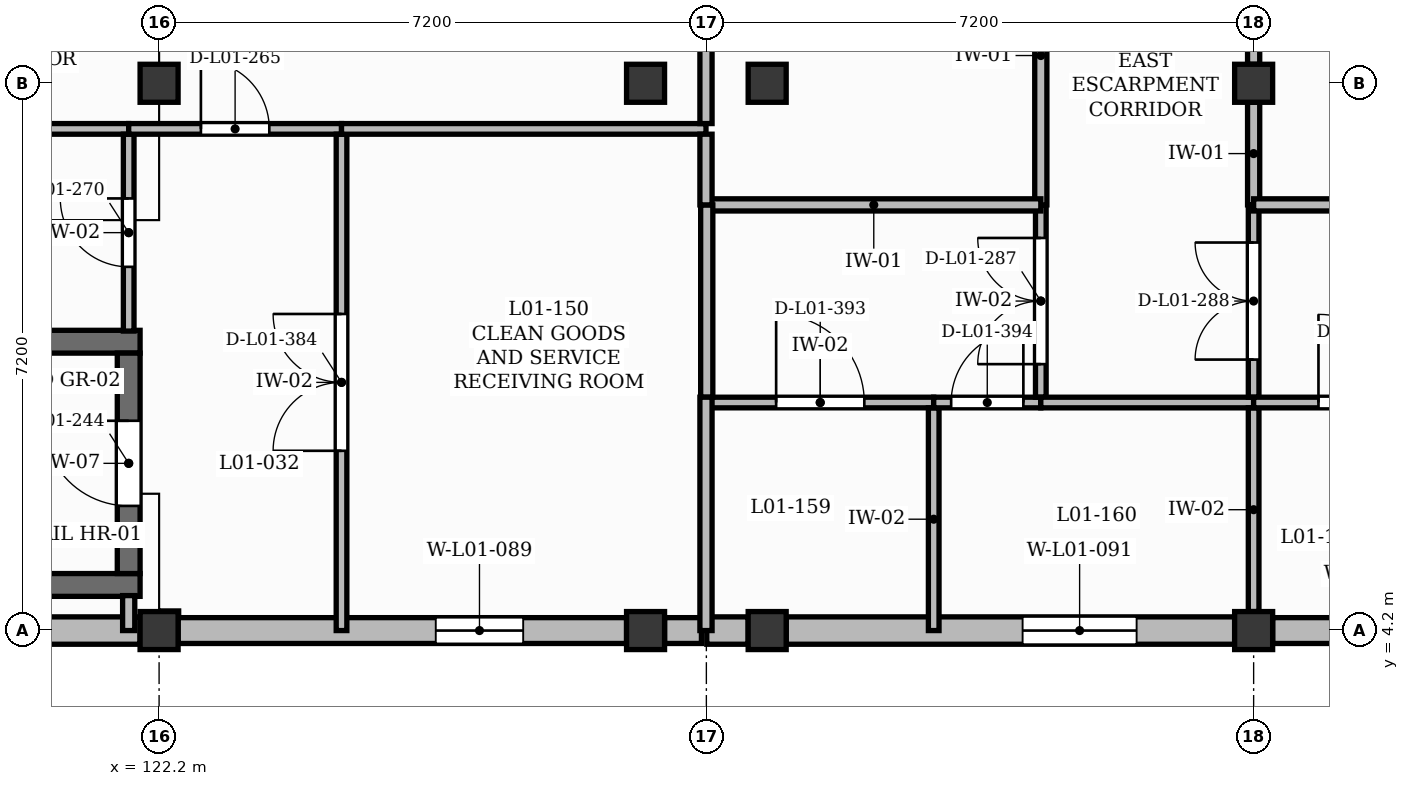
"""IFC4 building model, lengths in metres.
Left out: names, types, materials, properties, quantities, classifications, styles, units other than length and angle.
Written with IfcOpenShell. Run it as: python <this file> out.ifc"""

import sys

from ifc_helpers import new_model, si_unit, direction, frame, frame_2d, origin, origin_2d, place, context, subcontext, project, spatial, rectangle, extrude, element, fill, save


model = new_model("IFC4")
c1 = context("Model", 3, precision=1e-05, world=origin(), true_north=direction((0.0, 1.0)))
c2 = subcontext(c1, "Body", "Model", "MODEL_VIEW")
j1 = project(units=[si_unit("LENGTHUNIT", "METRE"), si_unit("PLANEANGLEUNIT", "RADIAN")], contexts=[c1])
p1 = place(None, origin())
s1 = spatial("IfcSite", under=j1, at=p1, CompositionType="ELEMENT")
p2 = place(p1, origin())
s2 = spatial("IfcBuilding", under=s1, at=p2, CompositionType="ELEMENT")
p3 = place(p2, frame((0.0, 0.0, 4.5)))
s3 = spatial("IfcBuildingStorey", under=s2, at=p3, CompositionType="ELEMENT", Elevation=4.5)
for number, where, z_axis, x_axis in (
    (1, (122.2, 4.2, 0.0), (0.0, 0.0, 1.0), (1.0, 0.0, 0.0)),
    (2, (122.2, 11.4, 0.0), (0.0, 0.0, 1.0), (1.0, 0.0, 0.0)),
    (3, (128.6, 4.2, 0.0), (0.0, 0.0, 1.0), (1.0, 0.0, 0.0)),
    (4, (128.6, 11.4, 0.0), (0.0, 0.0, 1.0), (1.0, 0.0, 0.0)),
    (5, (130.2, 4.2, 0.0), (0.0, 0.0, 1.0), (1.0, 0.0, 0.0)),
    (6, (130.2, 11.4, 0.0), (0.0, 0.0, 1.0), (1.0, 0.0, 0.0)),
    (7, (136.6, 4.2, 0.0), (0.0, 0.0, 1.0), (1.0, 0.0, 0.0)),
    (8, (136.6, 11.4, 0.0), (0.0, 0.0, 1.0), (1.0, 0.0, 0.0)),
):
    element("IfcColumn", number, at=place(p3, frame(where, z_axis=z_axis, x_axis=x_axis)), inside=s3, PredefinedType="COLUMN", context=c2, shape_type="SweptSolid", body=[
        extrude(rectangle(XDim=0.5, YDim=0.5, at=origin_2d()), origin(), (0.0, 0.0, 1.0), 4.22),
    ])
p4 = place(p3, frame((115.25, 4.2, 0.0), z_axis=(0.0, 0.0, 1.0), x_axis=(1.0, 0.0, 0.0)))
e9 = element("IfcWall", 9, at=p4, inside=s3, PredefinedType="SOLIDWALL", context=c2, shape_type="SweptSolid", body=[
    extrude(rectangle(XDim=6.7, YDim=0.36, at=frame_2d((3.35, 0.0))), origin(), (0.0, 0.0, 1.0), 3.52),
])
p5 = place(p3, frame((122.45, 4.2, 0.0), z_axis=(0.0, 0.0, 1.0), x_axis=(1.0, 0.0, 0.0)))
e10 = element("IfcWall", 10, at=p5, inside=s3, PredefinedType="SOLIDWALL", context=c2, shape_type="SweptSolid", body=[
    extrude(rectangle(XDim=5.9, YDim=0.34, at=frame_2d((2.95, 0.0))), origin(), (0.0, 0.0, 1.0), 3.52),
])
p6 = place(p5, frame((3.39, 0.0, 1.5)))
e11 = element("IfcOpeningElement", 11, at=p6, cuts=e10, PredefinedType="OPENING", context=c2, shape_type="SweptSolid", body=[
    extrude(rectangle(XDim=1.15, YDim=1.25, at=frame_2d((0.575, 0.625))), frame((0.0, 0.18, 0.0), z_axis=(0.0, -1.0, 0.0), x_axis=(1.0, 0.0, 0.0)), (0.0, 0.0, 1.0), 0.36),
])
p7 = place(p3, frame((128.85, 4.2, 0.0), z_axis=(0.0, 0.0, 1.0), x_axis=(1.0, 0.0, 0.0)))
e12 = element("IfcWall", 12, at=p7, inside=s3, PredefinedType="SOLIDWALL", context=c2, shape_type="SweptSolid", body=[
    extrude(rectangle(XDim=0.485, YDim=0.34, at=frame_2d((0.242, 0.0))), origin(), (0.0, 0.0, 1.0), 4.22),
])
p8 = place(p3, frame((129.405, 4.2, 0.0), z_axis=(0.0, 0.0, 1.0), x_axis=(1.0, 0.0, 0.0)))
e13 = element("IfcWall", 13, at=p8, inside=s3, PredefinedType="SOLIDWALL", context=c2, shape_type="SweptSolid", body=[
    extrude(rectangle(XDim=0.545, YDim=0.36, at=frame_2d((0.272, 0.0))), origin(), (0.0, 0.0, 1.0), 4.22),
])
p9 = place(p3, frame((130.45, 4.2, 0.0), z_axis=(0.0, 0.0, 1.0), x_axis=(1.0, 0.0, 0.0)))
e14 = element("IfcWall", 14, at=p9, inside=s3, PredefinedType="SOLIDWALL", context=c2, shape_type="SweptSolid", body=[
    extrude(rectangle(XDim=5.9, YDim=0.36, at=frame_2d((2.95, 0.0))), origin(), (0.0, 0.0, 1.0), 3.52),
])
p10 = place(p9, frame((3.111, 0.0, 1.5)))
e15 = element("IfcOpeningElement", 15, at=p10, cuts=e14, PredefinedType="OPENING", context=c2, shape_type="SweptSolid", body=[
    extrude(rectangle(XDim=1.5, YDim=1.25, at=frame_2d((0.75, 0.625))), frame((0.0, 0.19, 0.0), z_axis=(0.0, -1.0, 0.0), x_axis=(1.0, 0.0, 0.0)), (0.0, 0.0, 1.0), 0.38),
])
p11 = place(p3, frame((136.85, 4.2, 0.0), z_axis=(0.0, 0.0, 1.0), x_axis=(1.0, 0.0, 0.0)))
e16 = element("IfcWall", 16, at=p11, inside=s3, PredefinedType="SOLIDWALL", context=c2, shape_type="SweptSolid", body=[
    extrude(rectangle(XDim=6.7, YDim=0.34, at=frame_2d((3.35, 0.0))), origin(), (0.0, 0.0, 1.0), 3.52),
])
p12 = place(p11, frame((0.818, 0.0, 1.0)))
e17 = element("IfcOpeningElement", 17, at=p12, cuts=e16, PredefinedType="OPENING", context=c2, shape_type="SweptSolid", body=[
    extrude(rectangle(XDim=1.1, YDim=1.8, at=frame_2d((0.55, 0.9))), frame((0.0, 0.18, 0.0), z_axis=(0.0, -1.0, 0.0), x_axis=(1.0, 0.0, 0.0)), (0.0, 0.0, 1.0), 0.36),
])
p13 = place(p11, frame((3.773, 0.0, 1.35)))
e18 = element("IfcOpeningElement", 18, at=p13, cuts=e16, PredefinedType="OPENING", context=c2, shape_type="SweptSolid", body=[
    extrude(rectangle(XDim=1.65, YDim=1.4, at=frame_2d((0.825, 0.7))), frame((0.0, 0.18, 0.0), z_axis=(0.0, -1.0, 0.0), x_axis=(1.0, 0.0, 0.0)), (0.0, 0.0, 1.0), 0.36),
])
for number, where, z_axis, x_axis in (
    (19, (115.25, 4.8, 0.0), (0.0, 0.0, 1.0), (1.0, 0.0, 0.0)),
    (20, (115.25, 8.0, 0.0), (0.0, 0.0, 1.0), (1.0, 0.0, 0.0)),
):
    element("IfcWall", number, at=place(p3, frame(where, z_axis=z_axis, x_axis=x_axis)), inside=s3, PredefinedType="SHEAR", context=c2, shape_type="SweptSolid", body=[
        extrude(rectangle(XDim=6.7, YDim=0.3, at=frame_2d((3.35, 0.0))), origin(), (0.0, 0.0, 1.0), 4.25),
    ])
p14 = place(p3, frame((121.8, 4.95, 0.0), z_axis=(0.0, 0.0, 1.0), x_axis=(0.0, 1.0, 0.0)))
e21 = element("IfcWall", 21, at=p14, inside=s3, PredefinedType="SHEAR", context=c2, shape_type="SweptSolid", body=[
    extrude(rectangle(XDim=2.9, YDim=0.3, at=frame_2d((1.45, 0.0))), origin(), (0.0, 0.0, 1.0), 4.25),
])
p15 = place(p14, frame((0.89, 0.0, 0.0)))
e22 = element("IfcOpeningElement", 22, at=p15, cuts=e21, PredefinedType="OPENING", context=c2, shape_type="SweptSolid", body=[
    extrude(rectangle(XDim=1.12, YDim=2.1, at=frame_2d((0.56, 1.05))), frame((0.0, 0.16, 0.0), z_axis=(0.0, -1.0, 0.0), x_axis=(1.0, 0.0, 0.0)), (0.0, 0.0, 1.0), 0.32),
])
p16 = place(p3, frame((115.0, 10.8, 0.0), z_axis=(0.0, 0.0, 1.0), x_axis=(1.0, 0.0, 0.0)))
e23 = element("IfcWall", 23, at=p16, inside=s3, PredefinedType="PARTITIONING", context=c2, shape_type="SweptSolid", body=[
    extrude(rectangle(XDim=6.8, YDim=0.14, at=frame_2d((3.4, 0.0))), origin(), (0.0, 0.0, 1.0), 4.18),
])
p17 = place(p16, frame((2.95, 0.0, 0.0)))
e24 = element("IfcOpeningElement", 24, at=p17, cuts=e23, PredefinedType="OPENING", context=c2, shape_type="SweptSolid", body=[
    extrude(rectangle(XDim=0.9, YDim=2.1, at=frame_2d((0.45, 1.05))), frame((0.0, 0.08, 0.0), z_axis=(0.0, -1.0, 0.0), x_axis=(1.0, 0.0, 0.0)), (0.0, 0.0, 1.0), 0.16),
])
p18 = place(p3, frame((121.8, 8.14, 0.0), z_axis=(0.0, 0.0, 1.0), x_axis=(0.0, 1.0, 0.0)))
e25 = element("IfcWall", 25, at=p18, inside=s3, PredefinedType="PARTITIONING", context=c2, shape_type="SweptSolid", body=[
    extrude(rectangle(XDim=2.59, YDim=0.14, at=frame_2d((1.295, 0.0))), origin(), (0.0, 0.0, 1.0), 4.18),
])
p19 = place(p18, frame((0.845, 0.0, 0.0)))
e26 = element("IfcOpeningElement", 26, at=p19, cuts=e25, PredefinedType="OPENING", context=c2, shape_type="SweptSolid", body=[
    extrude(rectangle(XDim=0.9, YDim=2.1, at=frame_2d((0.45, 1.05))), frame((0.0, 0.08, 0.0), z_axis=(0.0, -1.0, 0.0), x_axis=(1.0, 0.0, 0.0)), (0.0, 0.0, 1.0), 0.16),
])
p20 = place(p3, frame((121.8, 10.8, 0.0), z_axis=(0.0, 0.0, 1.0), x_axis=(1.0, 0.0, 0.0)))
e27 = element("IfcWall", 27, at=p20, inside=s3, PredefinedType="PARTITIONING", context=c2, shape_type="SweptSolid", body=[
    extrude(rectangle(XDim=2.8, YDim=0.14, at=frame_2d((1.4, 0.0))), origin(), (0.0, 0.0, 1.0), 4.18),
])
p21 = place(p20, frame((0.95, 0.0, 0.0)))
e28 = element("IfcOpeningElement", 28, at=p21, cuts=e27, PredefinedType="OPENING", context=c2, shape_type="SweptSolid", body=[
    extrude(rectangle(XDim=0.9, YDim=2.1, at=frame_2d((0.45, 1.05))), frame((0.0, 0.08, 0.0), z_axis=(0.0, -1.0, 0.0), x_axis=(1.0, 0.0, 0.0)), (0.0, 0.0, 1.0), 0.16),
])
p22 = place(p3, frame((124.6, 4.2, 0.0), z_axis=(0.0, 0.0, 1.0), x_axis=(0.0, 1.0, 0.0)))
e29 = element("IfcWall", 29, at=p22, inside=s3, PredefinedType="PARTITIONING", context=c2, shape_type="SweptSolid", body=[
    extrude(rectangle(XDim=6.53, YDim=0.14, at=frame_2d((3.265, 0.0))), origin(), (0.0, 0.0, 1.0), 4.18),
])
p23 = place(p22, frame((2.365, 0.0, 0.0)))
e30 = element("IfcOpeningElement", 30, at=p23, cuts=e29, PredefinedType="OPENING", context=c2, shape_type="SweptSolid", body=[
    extrude(rectangle(XDim=1.8, YDim=2.3, at=frame_2d((0.9, 1.15))), frame((0.0, 0.08, 0.0), z_axis=(0.0, -1.0, 0.0), x_axis=(1.0, 0.0, 0.0)), (0.0, 0.0, 1.0), 0.16),
])
p24 = place(p3, frame((124.6, 10.8, 0.0), z_axis=(0.0, 0.0, 1.0), x_axis=(1.0, 0.0, 0.0)))
e31 = element("IfcWall", 31, at=p24, inside=s3, PredefinedType="PARTITIONING", context=c2, shape_type="SweptSolid", body=[
    extrude(rectangle(XDim=4.795, YDim=0.14, at=frame_2d((2.397, 0.0))), origin(), (0.0, 0.0, 1.0), 4.18),
])
p25 = place(p3, frame((129.405, 7.2, 0.0), z_axis=(0.0, 0.0, 1.0), x_axis=(1.0, 0.0, 0.0)))
e32 = element("IfcWall", 32, at=p25, inside=s3, PredefinedType="PARTITIONING", context=c2, shape_type="SweptSolid", body=[
    extrude(rectangle(XDim=2.986, YDim=0.14, at=frame_2d((1.493, 0.0))), origin(), (0.0, 0.0, 1.0), 4.18),
])
p26 = place(p25, frame((0.913, 0.0, 0.0)))
e33 = element("IfcOpeningElement", 33, at=p26, cuts=e32, PredefinedType="OPENING", context=c2, shape_type="SweptSolid", body=[
    extrude(rectangle(XDim=1.16, YDim=2.1, at=frame_2d((0.58, 1.05))), frame((0.0, 0.08, 0.0), z_axis=(0.0, -1.0, 0.0), x_axis=(1.0, 0.0, 0.0)), (0.0, 0.0, 1.0), 0.16),
])
p27 = place(p3, frame((132.391, 4.2, 0.0), z_axis=(0.0, 0.0, 1.0), x_axis=(0.0, 1.0, 0.0)))
e34 = element("IfcWall", 34, at=p27, inside=s3, PredefinedType="PARTITIONING", context=c2, shape_type="SweptSolid", body=[
    extrude(rectangle(XDim=2.93, YDim=0.14, at=frame_2d((1.465, 0.0))), origin(), (0.0, 0.0, 1.0), 3.86),
])
p28 = place(p3, frame((132.391, 7.2, 0.0), z_axis=(0.0, 0.0, 1.0), x_axis=(1.0, 0.0, 0.0)))
e35 = element("IfcWall", 35, at=p28, inside=s3, PredefinedType="PARTITIONING", context=c2, shape_type="SweptSolid", body=[
    extrude(rectangle(XDim=1.409, YDim=0.14, at=frame_2d((0.705, 0.0))), origin(), (0.0, 0.0, 1.0), 4.18),
])
p29 = place(p28, frame((0.229, 0.0, 0.0)))
e36 = element("IfcOpeningElement", 36, at=p29, cuts=e35, PredefinedType="OPENING", context=c2, shape_type="SweptSolid", body=[
    extrude(rectangle(XDim=0.95, YDim=2.1, at=frame_2d((0.475, 1.05))), frame((0.0, 0.08, 0.0), z_axis=(0.0, -1.0, 0.0), x_axis=(1.0, 0.0, 0.0)), (0.0, 0.0, 1.0), 0.16),
])
p30 = place(p3, frame((133.8, 7.27, 0.0), z_axis=(0.0, 0.0, 1.0), x_axis=(0.0, 1.0, 0.0)))
e37 = element("IfcWall", 37, at=p30, inside=s3, PredefinedType="PARTITIONING", context=c2, shape_type="SweptSolid", body=[
    extrude(rectangle(XDim=2.53, YDim=0.14, at=frame_2d((1.265, 0.0))), origin(), (0.0, 0.0, 1.0), 4.18),
])
p31 = place(p30, frame((0.435, 0.0, 0.0)))
e38 = element("IfcOpeningElement", 38, at=p31, cuts=e37, PredefinedType="OPENING", context=c2, shape_type="SweptSolid", body=[
    extrude(rectangle(XDim=1.66, YDim=2.3, at=frame_2d((0.83, 1.15))), frame((0.0, 0.08, 0.0), z_axis=(0.0, -1.0, 0.0), x_axis=(1.0, 0.0, 0.0)), (0.0, 0.0, 1.0), 0.16),
])
p32 = place(p3, frame((133.8, 7.2, 0.0), z_axis=(0.0, 0.0, 1.0), x_axis=(1.0, 0.0, 0.0)))
e39 = element("IfcWall", 39, at=p32, inside=s3, PredefinedType="PARTITIONING", context=c2, shape_type="SweptSolid", body=[
    extrude(rectangle(XDim=2.8, YDim=0.14, at=frame_2d((1.4, 0.0))), origin(), (0.0, 0.0, 1.0), 4.18),
])
p33 = place(p3, frame((136.6, 4.45, 0.0), z_axis=(0.0, 0.0, 1.0), x_axis=(0.0, 1.0, 0.0)))
e40 = element("IfcWall", 40, at=p33, inside=s3, PredefinedType="PARTITIONING", context=c2, shape_type="SweptSolid", body=[
    extrude(rectangle(XDim=2.68, YDim=0.14, at=frame_2d((1.34, 0.0))), origin(), (0.0, 0.0, 1.0), 3.52),
])
p34 = place(p3, frame((136.6, 7.27, 0.0), z_axis=(0.0, 0.0, 1.0), x_axis=(0.0, 1.0, 0.0)))
e41 = element("IfcWall", 41, at=p34, inside=s3, PredefinedType="PARTITIONING", context=c2, shape_type="SweptSolid", body=[
    extrude(rectangle(XDim=2.53, YDim=0.14, at=frame_2d((1.265, 0.0))), origin(), (0.0, 0.0, 1.0), 3.52),
])
p35 = place(p34, frame((0.495, 0.0, 0.0)))
e42 = element("IfcOpeningElement", 42, at=p35, cuts=e41, PredefinedType="OPENING", context=c2, shape_type="SweptSolid", body=[
    extrude(rectangle(XDim=1.54, YDim=2.25, at=frame_2d((0.77, 1.125))), frame((0.0, 0.08, 0.0), z_axis=(0.0, -1.0, 0.0), x_axis=(1.0, 0.0, 0.0)), (0.0, 0.0, 1.0), 0.16),
])
p36 = place(p3, frame((136.6, 7.2, 0.0), z_axis=(0.0, 0.0, 1.0), x_axis=(1.0, 0.0, 0.0)))
e43 = element("IfcWall", 43, at=p36, inside=s3, PredefinedType="PARTITIONING", context=c2, shape_type="SweptSolid", body=[
    extrude(rectangle(XDim=2.866, YDim=0.14, at=frame_2d((1.433, 0.0))), origin(), (0.0, 0.0, 1.0), 4.18),
])
p37 = place(p36, frame((0.853, 0.0, 0.0)))
e44 = element("IfcOpeningElement", 44, at=p37, cuts=e43, PredefinedType="OPENING", context=c2, shape_type="SweptSolid", body=[
    extrude(rectangle(XDim=1.16, YDim=2.1, at=frame_2d((0.58, 1.05))), frame((0.0, 0.08, 0.0), z_axis=(0.0, -1.0, 0.0), x_axis=(1.0, 0.0, 0.0)), (0.0, 0.0, 1.0), 0.16),
])
p38 = place(p3, frame((129.395, 10.87, 0.0), z_axis=(0.0, 0.0, 1.0), x_axis=(0.0, 1.0, 0.0)))
e45 = element("IfcWall", 45, at=p38, inside=s3, PredefinedType="PARTITIONING", context=c2, shape_type="SweptSolid", body=[
    extrude(rectangle(XDim=2.53, YDim=0.16, at=frame_2d((1.265, 0.0))), origin(), (0.0, 0.0, 1.0), 4.18),
])
p39 = place(p3, frame((121.8, 4.2, 0.0), z_axis=(0.0, 0.0, 1.0), x_axis=(0.0, 1.0, 0.0)))
e46 = element("IfcWall", 46, at=p39, inside=s3, PredefinedType="PARTITIONING", context=c2, shape_type="SweptSolid", body=[
    extrude(rectangle(XDim=0.46, YDim=0.16, at=frame_2d((0.23, 0.0))), origin(), (0.0, 0.0, 1.0), 4.18),
])
p40 = place(p3, frame((136.6, 9.8, 0.0), z_axis=(0.0, 0.0, 1.0), x_axis=(0.0, 1.0, 0.0)))
e47 = element("IfcWall", 47, at=p40, inside=s3, PredefinedType="PARTITIONING", context=c2, shape_type="SweptSolid", body=[
    extrude(rectangle(XDim=1.35, YDim=0.16, at=frame_2d((0.675, 0.0))), origin(), (0.0, 0.0, 1.0), 3.52),
])
p41 = place(p3, frame((136.6, 11.65, 0.0), z_axis=(0.0, 0.0, 1.0), x_axis=(0.0, 1.0, 0.0)))
e48 = element("IfcWall", 48, at=p41, inside=s3, PredefinedType="PARTITIONING", context=c2, shape_type="SweptSolid", body=[
    extrude(rectangle(XDim=2.08, YDim=0.16, at=frame_2d((1.04, 0.0))), origin(), (0.0, 0.0, 1.0), 3.52),
])
p42 = place(p3, frame((133.8, 9.8, 0.0), z_axis=(0.0, 0.0, 1.0), x_axis=(0.0, 1.0, 0.0)))
e49 = element("IfcWall", 49, at=p42, inside=s3, PredefinedType="PARTITIONING", context=c2, shape_type="SweptSolid", body=[
    extrude(rectangle(XDim=3.93, YDim=0.16, at=frame_2d((1.965, 0.0))), origin(), (0.0, 0.0, 1.0), 4.18),
])
p43 = place(p3, frame((133.8, 9.8, 0.0), z_axis=(0.0, 0.0, 1.0), x_axis=(-1.0, 0.0, 0.0)))
e50 = element("IfcWall", 50, at=p43, inside=s3, PredefinedType="PARTITIONING", context=c2, shape_type="SweptSolid", body=[
    extrude(rectangle(XDim=4.395, YDim=0.16, at=frame_2d((2.198, 0.0))), origin(), (0.0, 0.0, 1.0), 4.18),
])
p44 = place(p3, frame((129.405, 7.27, 0.0), z_axis=(0.0, 0.0, 1.0), x_axis=(0.0, 1.0, 0.0)))
e51 = element("IfcWall", 51, at=p44, inside=s3, PredefinedType="PARTITIONING", context=c2, shape_type="SweptSolid", body=[
    extrude(rectangle(XDim=2.53, YDim=0.16, at=frame_2d((1.265, 0.0))), origin(), (0.0, 0.0, 1.0), 4.18),
])
p45 = place(p3, frame((143.8, 9.8, 0.0), z_axis=(0.0, 0.0, 1.0), x_axis=(-1.0, 0.0, 0.0)))
e52 = element("IfcWall", 52, at=p45, inside=s3, PredefinedType="PARTITIONING", context=c2, shape_type="SweptSolid", body=[
    extrude(rectangle(XDim=7.2, YDim=0.16, at=frame_2d((3.6, 0.0))), origin(), (0.0, 0.0, 1.0), 4.18),
])
p46 = place(p3, frame((129.395, 4.2, 0.0), z_axis=(0.0, 0.0, 1.0), x_axis=(0.0, 1.0, 0.0)))
e53 = element("IfcWall", 53, at=p46, inside=s3, PredefinedType="PARTITIONING", context=c2, shape_type="SweptSolid", body=[
    extrude(rectangle(XDim=3.07, YDim=0.16, at=frame_2d((1.535, 0.0))), origin(), (0.0, 0.0, 1.0), 4.18),
])
p47 = place(p3, frame((129.395, 9.8, 0.0), z_axis=(0.0, 0.0, 1.0), x_axis=(0.0, 1.0, 0.0)))
e54 = element("IfcWall", 54, at=p47, inside=s3, PredefinedType="PARTITIONING", context=c2, shape_type="SweptSolid", body=[
    extrude(rectangle(XDim=0.93, YDim=0.16, at=frame_2d((0.465, 0.0))), origin(), (0.0, 0.0, 1.0), 4.18),
])
p48 = place(p6, origin())
e55 = element("IfcWindow", 55, at=p48, inside=s3, PartitioningType="SINGLE_PANEL", PredefinedType="WINDOW", context=c2, shape_type="SweptSolid", body=[
    extrude(rectangle(XDim=1.15, YDim=1.25, at=frame_2d((0.575, 0.625))), frame((0.0, 0.03, 0.0), z_axis=(0.0, -1.0, 0.0), x_axis=(1.0, 0.0, 0.0)), (0.0, 0.0, 1.0), 0.06),
])
fill(e11, e55)
p49 = place(p10, origin())
e56 = element("IfcWindow", 56, at=p49, inside=s3, PartitioningType="DOUBLE_PANEL_VERTICAL", PredefinedType="WINDOW", context=c2, shape_type="SweptSolid", body=[
    extrude(rectangle(XDim=1.5, YDim=1.25, at=frame_2d((0.75, 0.625))), frame((0.0, 0.03, 0.0), z_axis=(0.0, -1.0, 0.0), x_axis=(1.0, 0.0, 0.0)), (0.0, 0.0, 1.0), 0.06),
])
fill(e15, e56)
p50 = place(p15, origin())
e57 = element("IfcDoor", 57, at=p50, inside=s3, OperationType="SINGLE_SWING_RIGHT", PredefinedType="DOOR", context=c2, shape_type="SweptSolid", body=[
    extrude(rectangle(XDim=1.12, YDim=2.1, at=frame_2d((0.56, 1.05))), frame((0.0, 0.025, 0.0), z_axis=(0.0, -1.0, 0.0), x_axis=(1.0, 0.0, 0.0)), (0.0, 0.0, 1.0), 0.05),
])
fill(e22, e57)
p51 = place(p21, origin())
e58 = element("IfcDoor", 58, at=p51, inside=s3, OperationType="SINGLE_SWING_LEFT", PredefinedType="DOOR", context=c2, shape_type="SweptSolid", body=[
    extrude(rectangle(XDim=0.9, YDim=2.1, at=frame_2d((0.45, 1.05))), frame((0.0, 0.025, 0.0), z_axis=(0.0, -1.0, 0.0), x_axis=(1.0, 0.0, 0.0)), (0.0, 0.0, 1.0), 0.05),
])
fill(e28, e58)
p52 = place(p19, origin())
e59 = element("IfcDoor", 59, at=p52, inside=s3, OperationType="SINGLE_SWING_RIGHT", PredefinedType="DOOR", context=c2, shape_type="SweptSolid", body=[
    extrude(rectangle(XDim=0.9, YDim=2.1, at=frame_2d((0.45, 1.05))), frame((0.0, 0.025, 0.0), z_axis=(0.0, -1.0, 0.0), x_axis=(1.0, 0.0, 0.0)), (0.0, 0.0, 1.0), 0.05),
])
fill(e26, e59)
p53 = place(p31, origin())
e60 = element("IfcDoor", 60, at=p53, inside=s3, OperationType="DOUBLE_DOOR_SINGLE_SWING", PredefinedType="DOOR", context=c2, shape_type="SweptSolid", body=[
    extrude(rectangle(XDim=1.66, YDim=2.3, at=frame_2d((0.83, 1.15))), frame((0.0, 0.025, 0.0), z_axis=(0.0, -1.0, 0.0), x_axis=(1.0, 0.0, 0.0)), (0.0, 0.0, 1.0), 0.05),
])
fill(e38, e60)
p54 = place(p35, origin())
e61 = element("IfcDoor", 61, at=p54, inside=s3, OperationType="DOUBLE_DOOR_SINGLE_SWING", PredefinedType="DOOR", context=c2, shape_type="SweptSolid", body=[
    extrude(rectangle(XDim=1.54, YDim=2.25, at=frame_2d((0.77, 1.125))), frame((0.0, 0.025, 0.0), z_axis=(0.0, -1.0, 0.0), x_axis=(1.0, 0.0, 0.0)), (0.0, 0.0, 1.0), 0.05),
])
fill(e42, e61)
p55 = place(p23, origin())
e62 = element("IfcDoor", 62, at=p55, inside=s3, OperationType="DOUBLE_DOOR_SINGLE_SWING", PredefinedType="DOOR", context=c2, shape_type="SweptSolid", body=[
    extrude(rectangle(XDim=1.8, YDim=2.3, at=frame_2d((0.9, 1.15))), frame((0.0, 0.025, 0.0), z_axis=(0.0, -1.0, 0.0), x_axis=(1.0, 0.0, 0.0)), (0.0, 0.0, 1.0), 0.05),
])
fill(e30, e62)
p56 = place(p26, origin())
e63 = element("IfcDoor", 63, at=p56, inside=s3, OperationType="SINGLE_SWING_LEFT", PredefinedType="DOOR", context=c2, shape_type="SweptSolid", body=[
    extrude(rectangle(XDim=1.16, YDim=2.1, at=frame_2d((0.58, 1.05))), frame((0.0, 0.025, 0.0), z_axis=(0.0, -1.0, 0.0), x_axis=(1.0, 0.0, 0.0)), (0.0, 0.0, 1.0), 0.05),
])
fill(e33, e63)
p57 = place(p29, origin())
e64 = element("IfcDoor", 64, at=p57, inside=s3, OperationType="SINGLE_SWING_RIGHT", PredefinedType="DOOR", context=c2, shape_type="SweptSolid", body=[
    extrude(rectangle(XDim=0.95, YDim=2.1, at=frame_2d((0.475, 1.05))), frame((0.0, 0.025, 0.0), z_axis=(0.0, -1.0, 0.0), x_axis=(1.0, 0.0, 0.0)), (0.0, 0.0, 1.0), 0.05),
])
fill(e36, e64)
p58 = place(p37, origin())
e65 = element("IfcDoor", 65, at=p58, inside=s3, OperationType="SINGLE_SWING_LEFT", PredefinedType="DOOR", context=c2, shape_type="SweptSolid", body=[
    extrude(rectangle(XDim=1.16, YDim=2.1, at=frame_2d((0.58, 1.05))), frame((0.0, 0.025, 0.0), z_axis=(0.0, -1.0, 0.0), x_axis=(1.0, 0.0, 0.0)), (0.0, 0.0, 1.0), 0.05),
])
fill(e44, e65)
save(model, sys.argv[1])
